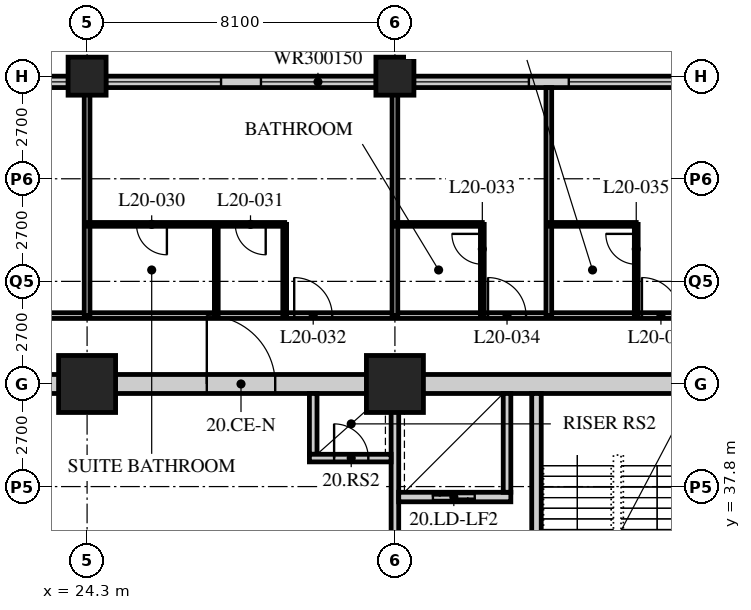
"""IFC4 building model, lengths in metres.
Left out: names, types, materials, properties, quantities, classifications, styles, units other than length and angle.
Written with IfcOpenShell. Run it as: python <this file> out.ifc"""

import sys

from ifc_helpers import new_model, si_unit, direction, frame, frame_2d, origin, origin_2d, place, context, subcontext, project, spatial, rectangle, hollow_rectangle, extrude, element, fill, save


model = new_model("IFC4")
c1 = context("Model", 3, precision=1e-05, world=origin(), true_north=direction((0.0, 1.0)))
c2 = subcontext(c1, "Body", "Model", "MODEL_VIEW")
j1 = project(units=[si_unit("LENGTHUNIT", "METRE"), si_unit("PLANEANGLEUNIT", "RADIAN")], contexts=[c1])
p1 = place(None, origin())
s1 = spatial("IfcSite", under=j1, at=p1, CompositionType="ELEMENT")
p2 = place(p1, origin())
s2 = spatial("IfcBuilding", under=s1, at=p2, CompositionType="ELEMENT")
p3 = place(p2, frame((0.0, 0.0, 80.6)))
s3 = spatial("IfcBuildingStorey", under=s2, at=p3, CompositionType="ELEMENT", Elevation=80.6)
p4 = place(p3, frame((24.3, 40.5, 0.0), z_axis=(0.0, 0.0, 1.0), x_axis=(1.0, 0.0, 0.0)))
e1 = element("IfcColumn", 1, at=p4, inside=s3, PredefinedType="COLUMN", context=c2, shape_type="SweptSolid", body=[
    extrude(hollow_rectangle(XDim=1.5, YDim=1.5, WallThickness=0.13, at=origin_2d()), origin(), (0.0, 0.0, 1.0), 3.4),
])
p5 = place(p3, frame((24.3, 48.6, 0.0), z_axis=(0.0, 0.0, 1.0), x_axis=(1.0, 0.0, 0.0)))
e2 = element("IfcColumn", 2, at=p5, inside=s3, PredefinedType="COLUMN", context=c2, shape_type="SweptSolid", body=[
    extrude(hollow_rectangle(XDim=1.0, YDim=1.0, WallThickness=0.1, at=origin_2d()), origin(), (0.0, 0.0, 1.0), 3.4),
])
p6 = place(p3, frame((32.4, 40.5, 0.0), z_axis=(0.0, 0.0, 1.0), x_axis=(1.0, 0.0, 0.0)))
e3 = element("IfcColumn", 3, at=p6, inside=s3, PredefinedType="COLUMN", context=c2, shape_type="SweptSolid", body=[
    extrude(hollow_rectangle(XDim=1.5, YDim=1.5, WallThickness=0.13, at=origin_2d()), origin(), (0.0, 0.0, 1.0), 3.4),
])
p7 = place(p3, frame((32.4, 48.6, 0.0), z_axis=(0.0, 0.0, 1.0), x_axis=(1.0, 0.0, 0.0)))
e4 = element("IfcColumn", 4, at=p7, inside=s3, PredefinedType="COLUMN", context=c2, shape_type="SweptSolid", body=[
    extrude(hollow_rectangle(XDim=1.0, YDim=1.0, WallThickness=0.1, at=origin_2d()), origin(), (0.0, 0.0, 1.0), 3.4),
])
p8 = place(p3, frame((48.3, 48.45, 0.0), z_axis=(0.0, 0.0, 1.0), x_axis=(-1.0, 0.0, 0.0)))
e5 = element("IfcWall", 5, at=p8, inside=s3, PredefinedType="SOLIDWALL", context=c2, shape_type="SweptSolid", body=[
    extrude(rectangle(XDim=40.2, YDim=0.3, at=frame_2d((20.1, 0.0))), origin(), (0.0, 0.0, 1.0), 3.19),
])
p9 = place(p8, frame((0.225, 0.0, 0.9)))
e6 = element("IfcOpeningElement", 6, at=p9, cuts=e5, PredefinedType="OPENING", context=c2, shape_type="SweptSolid", body=[
    extrude(rectangle(XDim=3.0, YDim=1.5, at=frame_2d((1.5, 0.75))), frame((0.0, 0.16, 0.0), z_axis=(0.0, -1.0, 0.0), x_axis=(1.0, 0.0, 0.0)), (0.0, 0.0, 1.0), 0.32),
])
p10 = place(p8, frame((4.275, 0.0, 0.9)))
e7 = element("IfcOpeningElement", 7, at=p10, cuts=e5, PredefinedType="OPENING", context=c2, shape_type="SweptSolid", body=[
    extrude(rectangle(XDim=3.0, YDim=1.5, at=frame_2d((1.5, 0.75))), frame((0.0, 0.16, 0.0), z_axis=(0.0, -1.0, 0.0), x_axis=(1.0, 0.0, 0.0)), (0.0, 0.0, 1.0), 0.32),
])
p11 = place(p8, frame((8.325, 0.0, 0.9)))
e8 = element("IfcOpeningElement", 8, at=p11, cuts=e5, PredefinedType="OPENING", context=c2, shape_type="SweptSolid", body=[
    extrude(rectangle(XDim=3.0, YDim=1.5, at=frame_2d((1.5, 0.75))), frame((0.0, 0.16, 0.0), z_axis=(0.0, -1.0, 0.0), x_axis=(1.0, 0.0, 0.0)), (0.0, 0.0, 1.0), 0.32),
])
p12 = place(p8, frame((12.375, 0.0, 0.9)))
e9 = element("IfcOpeningElement", 9, at=p12, cuts=e5, PredefinedType="OPENING", context=c2, shape_type="SweptSolid", body=[
    extrude(rectangle(XDim=3.0, YDim=1.5, at=frame_2d((1.5, 0.75))), frame((0.0, 0.16, 0.0), z_axis=(0.0, -1.0, 0.0), x_axis=(1.0, 0.0, 0.0)), (0.0, 0.0, 1.0), 0.32),
])
p13 = place(p8, frame((16.425, 0.0, 0.9)))
e10 = element("IfcOpeningElement", 10, at=p13, cuts=e5, PredefinedType="OPENING", context=c2, shape_type="SweptSolid", body=[
    extrude(rectangle(XDim=3.0, YDim=1.5, at=frame_2d((1.5, 0.75))), frame((0.0, 0.16, 0.0), z_axis=(0.0, -1.0, 0.0), x_axis=(1.0, 0.0, 0.0)), (0.0, 0.0, 1.0), 0.32),
])
p14 = place(p8, frame((20.475, 0.0, 0.9)))
e11 = element("IfcOpeningElement", 11, at=p14, cuts=e5, PredefinedType="OPENING", context=c2, shape_type="SweptSolid", body=[
    extrude(rectangle(XDim=3.0, YDim=1.5, at=frame_2d((1.5, 0.75))), frame((0.0, 0.16, 0.0), z_axis=(0.0, -1.0, 0.0), x_axis=(1.0, 0.0, 0.0)), (0.0, 0.0, 1.0), 0.32),
])
p15 = place(p8, frame((24.525, 0.0, 0.9)))
e12 = element("IfcOpeningElement", 12, at=p15, cuts=e5, PredefinedType="OPENING", context=c2, shape_type="SweptSolid", body=[
    extrude(rectangle(XDim=3.0, YDim=1.5, at=frame_2d((1.5, 0.75))), frame((0.0, 0.16, 0.0), z_axis=(0.0, -1.0, 0.0), x_axis=(1.0, 0.0, 0.0)), (0.0, 0.0, 1.0), 0.32),
])
p16 = place(p8, frame((28.575, 0.0, 0.9)))
e13 = element("IfcOpeningElement", 13, at=p16, cuts=e5, PredefinedType="OPENING", context=c2, shape_type="SweptSolid", body=[
    extrude(rectangle(XDim=3.0, YDim=1.5, at=frame_2d((1.5, 0.75))), frame((0.0, 0.16, 0.0), z_axis=(0.0, -1.0, 0.0), x_axis=(1.0, 0.0, 0.0)), (0.0, 0.0, 1.0), 0.32),
])
p17 = place(p8, frame((32.625, 0.0, 0.9)))
e14 = element("IfcOpeningElement", 14, at=p17, cuts=e5, PredefinedType="OPENING", context=c2, shape_type="SweptSolid", body=[
    extrude(rectangle(XDim=3.0, YDim=1.5, at=frame_2d((1.5, 0.75))), frame((0.0, 0.16, 0.0), z_axis=(0.0, -1.0, 0.0), x_axis=(1.0, 0.0, 0.0)), (0.0, 0.0, 1.0), 0.32),
])
p18 = place(p8, frame((36.675, 0.0, 0.9)))
e15 = element("IfcOpeningElement", 15, at=p18, cuts=e5, PredefinedType="OPENING", context=c2, shape_type="SweptSolid", body=[
    extrude(rectangle(XDim=3.0, YDim=1.5, at=frame_2d((1.5, 0.75))), frame((0.0, 0.16, 0.0), z_axis=(0.0, -1.0, 0.0), x_axis=(1.0, 0.0, 0.0)), (0.0, 0.0, 1.0), 0.32),
])
p19 = place(p3, frame((12.15, 42.3, 0.0), z_axis=(0.0, 0.0, 1.0), x_axis=(1.0, 0.0, 0.0)))
e16 = element("IfcWall", 16, at=p19, inside=s3, PredefinedType="PARTITIONING", context=c2, shape_type="SweptSolid", body=[
    extrude(rectangle(XDim=36.45, YDim=0.15, at=frame_2d((18.225, 0.0))), origin(), (0.0, 0.0, 1.0), 3.19),
])
p20 = place(p19, frame((9.5, 0.0, 0.0)))
e17 = element("IfcOpeningElement", 17, at=p20, cuts=e16, PredefinedType="OPENING", context=c2, shape_type="SweptSolid", body=[
    extrude(rectangle(XDim=1.0, YDim=2.1, at=frame_2d((0.5, 1.05))), frame((0.0, 0.085, 0.0), z_axis=(0.0, -1.0, 0.0), x_axis=(1.0, 0.0, 0.0)), (0.0, 0.0, 1.0), 0.17),
])
p21 = place(p19, frame((17.6, 0.0, 0.0)))
e18 = element("IfcOpeningElement", 18, at=p21, cuts=e16, PredefinedType="OPENING", context=c2, shape_type="SweptSolid", body=[
    extrude(rectangle(XDim=1.0, YDim=2.1, at=frame_2d((0.5, 1.05))), frame((0.0, 0.085, 0.0), z_axis=(0.0, -1.0, 0.0), x_axis=(1.0, 0.0, 0.0)), (0.0, 0.0, 1.0), 0.17),
])
p22 = place(p19, frame((22.7, 0.0, 0.0)))
e19 = element("IfcOpeningElement", 19, at=p22, cuts=e16, PredefinedType="OPENING", context=c2, shape_type="SweptSolid", body=[
    extrude(rectangle(XDim=1.0, YDim=2.1, at=frame_2d((0.5, 1.05))), frame((0.0, 0.085, 0.0), z_axis=(0.0, -1.0, 0.0), x_axis=(1.0, 0.0, 0.0)), (0.0, 0.0, 1.0), 0.17),
])
p23 = place(p19, frame((26.75, 0.0, 0.0)))
e20 = element("IfcOpeningElement", 20, at=p23, cuts=e16, PredefinedType="OPENING", context=c2, shape_type="SweptSolid", body=[
    extrude(rectangle(XDim=1.0, YDim=2.1, at=frame_2d((0.5, 1.05))), frame((0.0, 0.085, 0.0), z_axis=(0.0, -1.0, 0.0), x_axis=(1.0, 0.0, 0.0)), (0.0, 0.0, 1.0), 0.17),
])
p24 = place(p19, frame((30.8, 0.0, 0.0)))
e21 = element("IfcOpeningElement", 21, at=p24, cuts=e16, PredefinedType="OPENING", context=c2, shape_type="SweptSolid", body=[
    extrude(rectangle(XDim=1.0, YDim=2.1, at=frame_2d((0.5, 1.05))), frame((0.0, 0.085, 0.0), z_axis=(0.0, -1.0, 0.0), x_axis=(1.0, 0.0, 0.0)), (0.0, 0.0, 1.0), 0.17),
])
p25 = place(p19, frame((32.825, 0.0, 0.0)))
e22 = element("IfcOpeningElement", 22, at=p25, cuts=e16, PredefinedType="OPENING", context=c2, shape_type="SweptSolid", body=[
    extrude(rectangle(XDim=1.0, YDim=2.1, at=frame_2d((0.5, 1.05))), frame((0.0, 0.085, 0.0), z_axis=(0.0, -1.0, 0.0), x_axis=(1.0, 0.0, 0.0)), (0.0, 0.0, 1.0), 0.17),
])
p26 = place(p19, frame((2.375, 0.0, 0.0)))
e23 = element("IfcOpeningElement", 23, at=p26, cuts=e16, PredefinedType="OPENING", context=c2, shape_type="SweptSolid", body=[
    extrude(rectangle(XDim=1.0, YDim=2.1, at=frame_2d((0.5, 1.05))), frame((0.0, 0.085, 0.0), z_axis=(0.0, -1.0, 0.0), x_axis=(1.0, 0.0, 0.0)), (0.0, 0.0, 1.0), 0.17),
])
p27 = place(p3, frame((24.3, 42.3, 0.0), z_axis=(0.0, 0.0, 1.0), x_axis=(0.0, 1.0, 0.0)))
e24 = element("IfcWall", 24, at=p27, inside=s3, PredefinedType="PARTITIONING", context=c2, shape_type="SweptSolid", body=[
    extrude(rectangle(XDim=6.0, YDim=0.15, at=frame_2d((3.0, 0.0))), origin(), (0.0, 0.0, 1.0), 2.428),
])
p28 = place(p3, frame((24.3, 44.7, 0.0), z_axis=(0.0, 0.0, 1.0), x_axis=(1.0, 0.0, 0.0)))
e25 = element("IfcWall", 25, at=p28, inside=s3, PredefinedType="PARTITIONING", context=c2, shape_type="SweptSolid", body=[
    extrude(rectangle(XDim=5.2, YDim=0.1, at=frame_2d((2.6, 0.0))), origin(), (0.0, 0.0, 1.0), 3.19),
])
p29 = place(p28, frame((1.3, 0.0, 0.0)))
e26 = element("IfcOpeningElement", 26, at=p29, cuts=e25, PredefinedType="OPENING", context=c2, shape_type="SweptSolid", body=[
    extrude(rectangle(XDim=0.8, YDim=2.1, at=frame_2d((0.4, 1.05))), frame((0.0, 0.06, 0.0), z_axis=(0.0, -1.0, 0.0), x_axis=(1.0, 0.0, 0.0)), (0.0, 0.0, 1.0), 0.12),
])
p30 = place(p28, frame((3.9, 0.0, 0.0)))
e27 = element("IfcOpeningElement", 27, at=p30, cuts=e25, PredefinedType="OPENING", context=c2, shape_type="SweptSolid", body=[
    extrude(rectangle(XDim=0.8, YDim=2.1, at=frame_2d((0.4, 1.05))), frame((0.0, 0.06, 0.0), z_axis=(0.0, -1.0, 0.0), x_axis=(1.0, 0.0, 0.0)), (0.0, 0.0, 1.0), 0.12),
])
for number, where, z_axis, x_axis in (
    (28, (27.7, 42.3, 0.0), (0.0, 0.0, 1.0), (0.0, 1.0, 0.0)),
    (29, (29.5, 42.3, 0.0), (0.0, 0.0, 1.0), (0.0, 1.0, 0.0)),
):
    element("IfcWall", number, at=place(p3, frame(where, z_axis=z_axis, x_axis=x_axis)), inside=s3, PredefinedType="PARTITIONING", context=c2, shape_type="SweptSolid", body=[
        extrude(rectangle(XDim=2.4, YDim=0.1, at=frame_2d((1.2, 0.0))), origin(), (0.0, 0.0, 1.0), 3.19),
    ])
p31 = place(p3, frame((32.4, 42.3, 0.0), z_axis=(0.0, 0.0, 1.0), x_axis=(0.0, 1.0, 0.0)))
e30 = element("IfcWall", 30, at=p31, inside=s3, PredefinedType="PARTITIONING", context=c2, shape_type="SweptSolid", body=[
    extrude(rectangle(XDim=6.0, YDim=0.15, at=frame_2d((3.0, 0.0))), origin(), (0.0, 0.0, 1.0), 2.428),
])
p32 = place(p3, frame((32.4, 44.7, 0.0), z_axis=(0.0, 0.0, 1.0), x_axis=(1.0, 0.0, 0.0)))
e31 = element("IfcWall", 31, at=p32, inside=s3, PredefinedType="PARTITIONING", context=c2, shape_type="SweptSolid", body=[
    extrude(rectangle(XDim=2.3, YDim=0.1, at=frame_2d((1.15, 0.0))), origin(), (0.0, 0.0, 1.0), 3.19),
])
p33 = place(p3, frame((34.7, 42.3, 0.0), z_axis=(0.0, 0.0, 1.0), x_axis=(0.0, 1.0, 0.0)))
e32 = element("IfcWall", 32, at=p33, inside=s3, PredefinedType="PARTITIONING", context=c2, shape_type="SweptSolid", body=[
    extrude(rectangle(XDim=2.4, YDim=0.1, at=frame_2d((1.2, 0.0))), origin(), (0.0, 0.0, 1.0), 3.19),
])
p34 = place(p33, frame((1.35, 0.0, 0.0)))
e33 = element("IfcOpeningElement", 33, at=p34, cuts=e32, PredefinedType="OPENING", context=c2, shape_type="SweptSolid", body=[
    extrude(rectangle(XDim=0.8, YDim=2.1, at=frame_2d((0.4, 1.05))), frame((0.0, 0.06, 0.0), z_axis=(0.0, -1.0, 0.0), x_axis=(1.0, 0.0, 0.0)), (0.0, 0.0, 1.0), 0.12),
])
p35 = place(p3, frame((36.45, 42.3, 0.0), z_axis=(0.0, 0.0, 1.0), x_axis=(0.0, 1.0, 0.0)))
e34 = element("IfcWall", 34, at=p35, inside=s3, PredefinedType="PARTITIONING", context=c2, shape_type="SweptSolid", body=[
    extrude(rectangle(XDim=6.0, YDim=0.15, at=frame_2d((3.0, 0.0))), origin(), (0.0, 0.0, 1.0), 3.19),
])
p36 = place(p3, frame((36.45, 44.7, 0.0), z_axis=(0.0, 0.0, 1.0), x_axis=(1.0, 0.0, 0.0)))
e35 = element("IfcWall", 35, at=p36, inside=s3, PredefinedType="PARTITIONING", context=c2, shape_type="SweptSolid", body=[
    extrude(rectangle(XDim=2.3, YDim=0.1, at=frame_2d((1.15, 0.0))), origin(), (0.0, 0.0, 1.0), 3.19),
])
p37 = place(p3, frame((38.75, 42.3, 0.0), z_axis=(0.0, 0.0, 1.0), x_axis=(0.0, 1.0, 0.0)))
e36 = element("IfcWall", 36, at=p37, inside=s3, PredefinedType="PARTITIONING", context=c2, shape_type="SweptSolid", body=[
    extrude(rectangle(XDim=2.4, YDim=0.1, at=frame_2d((1.2, 0.0))), origin(), (0.0, 0.0, 1.0), 3.19),
])
p38 = place(p37, frame((1.35, 0.0, 0.0)))
e37 = element("IfcOpeningElement", 37, at=p38, cuts=e36, PredefinedType="OPENING", context=c2, shape_type="SweptSolid", body=[
    extrude(rectangle(XDim=0.8, YDim=2.1, at=frame_2d((0.4, 1.05))), frame((0.0, 0.06, 0.0), z_axis=(0.0, -1.0, 0.0), x_axis=(1.0, 0.0, 0.0)), (0.0, 0.0, 1.0), 0.12),
])
p39 = place(p3, frame((15.95, 40.5, 0.0), z_axis=(0.0, 0.0, 1.0), x_axis=(1.0, 0.0, 0.0)))
e38 = element("IfcWall", 38, at=p39, inside=s3, PredefinedType="SOLIDWALL", context=c2, shape_type="SweptSolid", body=[
    extrude(rectangle(XDim=24.8, YDim=0.5, at=frame_2d((12.4, 0.0))), origin(), (0.0, 0.0, 1.0), 2.428),
])
p40 = place(p39, frame((11.5, 0.0, 0.0)))
e39 = element("IfcOpeningElement", 39, at=p40, cuts=e38, PredefinedType="OPENING", context=c2, shape_type="SweptSolid", body=[
    extrude(rectangle(XDim=1.8, YDim=2.4, at=frame_2d((0.9, 1.2))), frame((0.0, 0.26, 0.0), z_axis=(0.0, -1.0, 0.0), x_axis=(1.0, 0.0, 0.0)), (0.0, 0.0, 1.0), 0.52),
])
p41 = place(p3, frame((32.4, 32.5, 0.0), z_axis=(0.0, 0.0, 1.0), x_axis=(0.0, 1.0, 0.0)))
e40 = element("IfcWall", 40, at=p41, inside=s3, PredefinedType="SOLIDWALL", context=c2, shape_type="SweptSolid", body=[
    extrude(rectangle(XDim=7.75, YDim=0.2, at=frame_2d((3.875, 0.0))), origin(), (0.0, 0.0, 1.0), 2.578),
])
p42 = place(p41, frame((1.9, 0.0, 0.0)))
e41 = element("IfcOpeningElement", 41, at=p42, cuts=e40, PredefinedType="OPENING", context=c2, shape_type="SweptSolid", body=[
    extrude(rectangle(XDim=1.2, YDim=2.1, at=frame_2d((0.6, 1.05))), frame((0.0, 0.11, 0.0), z_axis=(0.0, -1.0, 0.0), x_axis=(1.0, 0.0, 0.0)), (0.0, 0.0, 1.0), 0.22),
])
p43 = place(p3, frame((36.125, 32.5, 0.0), z_axis=(0.0, 0.0, 1.0), x_axis=(0.0, 1.0, 0.0)))
e42 = element("IfcWall", 42, at=p43, inside=s3, PredefinedType="SOLIDWALL", context=c2, shape_type="SweptSolid", body=[
    extrude(rectangle(XDim=7.75, YDim=0.25, at=frame_2d((3.875, 0.0))), origin(), (0.0, 0.0, 1.0), 3.19),
])
p44 = place(p43, frame((0.45, 0.0, 0.0)))
e43 = element("IfcOpeningElement", 43, at=p44, cuts=e42, PredefinedType="OPENING", context=c2, shape_type="SweptSolid", body=[
    extrude(rectangle(XDim=1.2, YDim=2.1, at=frame_2d((0.6, 1.05))), frame((0.0, 0.135, 0.0), z_axis=(0.0, -1.0, 0.0), x_axis=(1.0, 0.0, 0.0)), (0.0, 0.0, 1.0), 0.27),
])
p45 = place(p3, frame((32.5, 37.525, 0.0), z_axis=(0.0, 0.0, 1.0), x_axis=(1.0, 0.0, 0.0)))
e44 = element("IfcWall", 44, at=p45, inside=s3, PredefinedType="SOLIDWALL", context=c2, shape_type="SweptSolid", body=[
    extrude(rectangle(XDim=2.95, YDim=0.25, at=frame_2d((1.475, 0.0))), origin(), (0.0, 0.0, 1.0), 3.19),
])
p46 = place(p45, frame((0.9, 0.0, 0.0)))
e45 = element("IfcOpeningElement", 45, at=p46, cuts=e44, PredefinedType="OPENING", context=c2, shape_type="SweptSolid", body=[
    extrude(rectangle(XDim=1.1, YDim=2.4, at=frame_2d((0.55, 1.2))), frame((0.0, 0.135, 0.0), z_axis=(0.0, -1.0, 0.0), x_axis=(1.0, 0.0, 0.0)), (0.0, 0.0, 1.0), 0.27),
])
p47 = place(p3, frame((35.35, 37.65, 0.0), z_axis=(0.0, 0.0, 1.0), x_axis=(0.0, 1.0, 0.0)))
e46 = element("IfcWall", 46, at=p47, inside=s3, PredefinedType="SOLIDWALL", context=c2, shape_type="SweptSolid", body=[
    extrude(rectangle(XDim=2.6, YDim=0.2, at=frame_2d((1.3, 0.0))), origin(), (0.0, 0.0, 1.0), 3.19),
])
p48 = place(p3, frame((30.25, 38.65, 0.0), z_axis=(0.0, 0.0, 1.0), x_axis=(0.0, 1.0, 0.0)))
e47 = element("IfcWall", 47, at=p48, inside=s3, PredefinedType="SOLIDWALL", context=c2, shape_type="SweptSolid", body=[
    extrude(rectangle(XDim=1.6, YDim=0.2, at=frame_2d((0.8, 0.0))), origin(), (0.0, 0.0, 1.0), 3.19),
])
p49 = place(p3, frame((30.15, 38.55, 0.0), z_axis=(0.0, 0.0, 1.0), x_axis=(1.0, 0.0, 0.0)))
e48 = element("IfcWall", 48, at=p49, inside=s3, PredefinedType="SOLIDWALL", context=c2, shape_type="SweptSolid", body=[
    extrude(rectangle(XDim=2.15, YDim=0.2, at=frame_2d((1.075, 0.0))), origin(), (0.0, 0.0, 1.0), 3.19),
])
p50 = place(p49, frame((0.65, 0.0, 0.0)))
e49 = element("IfcOpeningElement", 49, at=p50, cuts=e48, PredefinedType="OPENING", context=c2, shape_type="SweptSolid", body=[
    extrude(rectangle(XDim=0.9, YDim=2.1, at=frame_2d((0.45, 1.05))), frame((0.0, 0.11, 0.0), z_axis=(0.0, -1.0, 0.0), x_axis=(1.0, 0.0, 0.0)), (0.0, 0.0, 1.0), 0.22),
])
p51 = place(p11, origin())
e50 = element("IfcWindow", 50, at=p51, inside=s3, PartitioningType="SINGLE_PANEL", PredefinedType="WINDOW", context=c2, shape_type="SweptSolid", body=[
    extrude(rectangle(XDim=3.0, YDim=1.5, at=frame_2d((1.5, 0.75))), frame((0.0, 0.03, 0.0), z_axis=(0.0, -1.0, 0.0), x_axis=(1.0, 0.0, 0.0)), (0.0, 0.0, 1.0), 0.06),
])
fill(e8, e50)
p52 = place(p12, origin())
e51 = element("IfcWindow", 51, at=p52, inside=s3, PartitioningType="SINGLE_PANEL", PredefinedType="WINDOW", context=c2, shape_type="SweptSolid", body=[
    extrude(rectangle(XDim=3.0, YDim=1.5, at=frame_2d((1.5, 0.75))), frame((0.0, 0.03, 0.0), z_axis=(0.0, -1.0, 0.0), x_axis=(1.0, 0.0, 0.0)), (0.0, 0.0, 1.0), 0.06),
])
fill(e9, e51)
p53 = place(p13, origin())
e52 = element("IfcWindow", 52, at=p53, inside=s3, PartitioningType="SINGLE_PANEL", PredefinedType="WINDOW", context=c2, shape_type="SweptSolid", body=[
    extrude(rectangle(XDim=3.0, YDim=1.5, at=frame_2d((1.5, 0.75))), frame((0.0, 0.03, 0.0), z_axis=(0.0, -1.0, 0.0), x_axis=(1.0, 0.0, 0.0)), (0.0, 0.0, 1.0), 0.06),
])
fill(e10, e52)
p54 = place(p14, origin())
e53 = element("IfcWindow", 53, at=p54, inside=s3, PartitioningType="SINGLE_PANEL", PredefinedType="WINDOW", context=c2, shape_type="SweptSolid", body=[
    extrude(rectangle(XDim=3.0, YDim=1.5, at=frame_2d((1.5, 0.75))), frame((0.0, 0.03, 0.0), z_axis=(0.0, -1.0, 0.0), x_axis=(1.0, 0.0, 0.0)), (0.0, 0.0, 1.0), 0.06),
])
fill(e11, e53)
p55 = place(p15, origin())
e54 = element("IfcWindow", 54, at=p55, inside=s3, PartitioningType="SINGLE_PANEL", PredefinedType="WINDOW", context=c2, shape_type="SweptSolid", body=[
    extrude(rectangle(XDim=3.0, YDim=1.5, at=frame_2d((1.5, 0.75))), frame((0.0, 0.03, 0.0), z_axis=(0.0, -1.0, 0.0), x_axis=(1.0, 0.0, 0.0)), (0.0, 0.0, 1.0), 0.06),
])
fill(e12, e54)
p56 = place(p29, origin())
e55 = element("IfcDoor", 55, at=p56, inside=s3, OperationType="SINGLE_SWING_LEFT", PredefinedType="DOOR", context=c2, shape_type="SweptSolid", body=[
    extrude(rectangle(XDim=0.8, YDim=2.1, at=frame_2d((0.4, 1.05))), frame((0.0, 0.025, 0.0), z_axis=(0.0, -1.0, 0.0), x_axis=(1.0, 0.0, 0.0)), (0.0, 0.0, 1.0), 0.05),
])
fill(e26, e55)
p57 = place(p30, origin())
e56 = element("IfcDoor", 56, at=p57, inside=s3, OperationType="SINGLE_SWING_LEFT", PredefinedType="DOOR", context=c2, shape_type="SweptSolid", body=[
    extrude(rectangle(XDim=0.8, YDim=2.1, at=frame_2d((0.4, 1.05))), frame((0.0, 0.025, 0.0), z_axis=(0.0, -1.0, 0.0), x_axis=(1.0, 0.0, 0.0)), (0.0, 0.0, 1.0), 0.05),
])
fill(e27, e56)
p58 = place(p21, origin())
e57 = element("IfcDoor", 57, at=p58, inside=s3, OperationType="SINGLE_SWING_LEFT", PredefinedType="DOOR", context=c2, shape_type="SweptSolid", body=[
    extrude(rectangle(XDim=1.0, YDim=2.1, at=frame_2d((0.5, 1.05))), frame((0.0, 0.025, 0.0), z_axis=(0.0, -1.0, 0.0), x_axis=(1.0, 0.0, 0.0)), (0.0, 0.0, 1.0), 0.05),
])
fill(e18, e57)
p59 = place(p34, origin())
e58 = element("IfcDoor", 58, at=p59, inside=s3, OperationType="SINGLE_SWING_RIGHT", PredefinedType="DOOR", context=c2, shape_type="SweptSolid", body=[
    extrude(rectangle(XDim=0.8, YDim=2.1, at=frame_2d((0.4, 1.05))), frame((0.0, 0.025, 0.0), z_axis=(0.0, -1.0, 0.0), x_axis=(1.0, 0.0, 0.0)), (0.0, 0.0, 1.0), 0.05),
])
fill(e33, e58)
p60 = place(p22, origin())
e59 = element("IfcDoor", 59, at=p60, inside=s3, OperationType="SINGLE_SWING_LEFT", PredefinedType="DOOR", context=c2, shape_type="SweptSolid", body=[
    extrude(rectangle(XDim=1.0, YDim=2.1, at=frame_2d((0.5, 1.05))), frame((0.0, 0.025, 0.0), z_axis=(0.0, -1.0, 0.0), x_axis=(1.0, 0.0, 0.0)), (0.0, 0.0, 1.0), 0.05),
])
fill(e19, e59)
p61 = place(p38, origin())
e60 = element("IfcDoor", 60, at=p61, inside=s3, OperationType="SINGLE_SWING_RIGHT", PredefinedType="DOOR", context=c2, shape_type="SweptSolid", body=[
    extrude(rectangle(XDim=0.8, YDim=2.1, at=frame_2d((0.4, 1.05))), frame((0.0, 0.025, 0.0), z_axis=(0.0, -1.0, 0.0), x_axis=(1.0, 0.0, 0.0)), (0.0, 0.0, 1.0), 0.05),
])
fill(e37, e60)
p62 = place(p23, origin())
e61 = element("IfcDoor", 61, at=p62, inside=s3, OperationType="SINGLE_SWING_LEFT", PredefinedType="DOOR", context=c2, shape_type="SweptSolid", body=[
    extrude(rectangle(XDim=1.0, YDim=2.1, at=frame_2d((0.5, 1.05))), frame((0.0, 0.025, 0.0), z_axis=(0.0, -1.0, 0.0), x_axis=(1.0, 0.0, 0.0)), (0.0, 0.0, 1.0), 0.05),
])
fill(e20, e61)
p63 = place(p50, origin())
e62 = element("IfcDoor", 62, at=p63, inside=s3, OperationType="SINGLE_SWING_LEFT", PredefinedType="DOOR", context=c2, shape_type="SweptSolid", body=[
    extrude(rectangle(XDim=0.9, YDim=2.1, at=frame_2d((0.45, 1.05))), frame((0.0, 0.025, 0.0), z_axis=(0.0, -1.0, 0.0), x_axis=(1.0, 0.0, 0.0)), (0.0, 0.0, 1.0), 0.05),
])
fill(e49, e62)
p64 = place(p46, origin())
e63 = element("IfcDoor", 63, at=p64, inside=s3, OperationType="DOUBLE_DOOR_SLIDING", PredefinedType="DOOR", context=c2, shape_type="SweptSolid", body=[
    extrude(rectangle(XDim=1.1, YDim=2.4, at=frame_2d((0.55, 1.2))), frame((0.0, 0.025, 0.0), z_axis=(0.0, -1.0, 0.0), x_axis=(1.0, 0.0, 0.0)), (0.0, 0.0, 1.0), 0.05),
])
fill(e45, e63)
p65 = place(p40, origin())
e64 = element("IfcDoor", 64, at=p65, inside=s3, OperationType="DOUBLE_DOOR_SINGLE_SWING", PredefinedType="DOOR", context=c2, shape_type="SweptSolid", body=[
    extrude(rectangle(XDim=1.8, YDim=2.4, at=frame_2d((0.9, 1.2))), frame((0.0, 0.025, 0.0), z_axis=(0.0, -1.0, 0.0), x_axis=(1.0, 0.0, 0.0)), (0.0, 0.0, 1.0), 0.05),
])
fill(e39, e64)
save(model, sys.argv[1])
